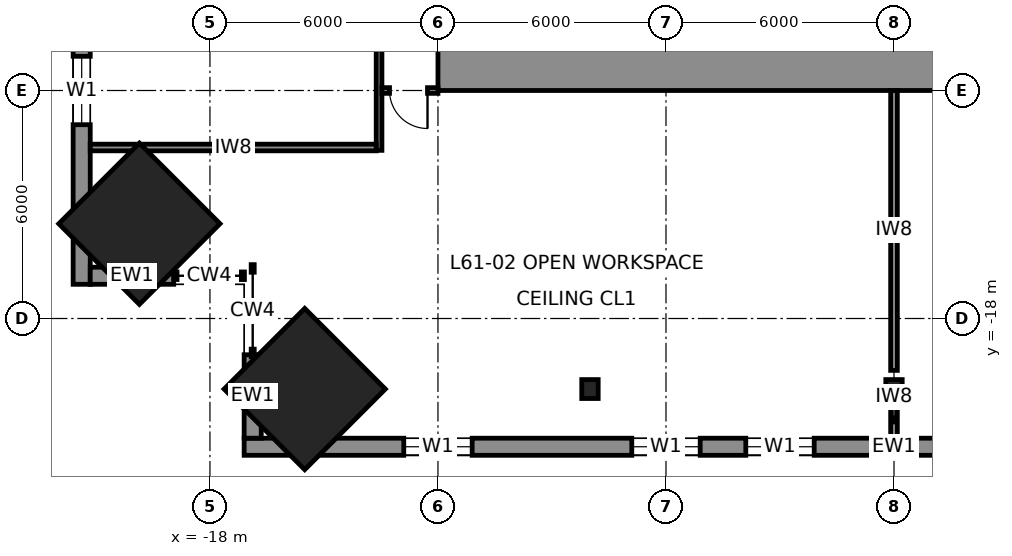
"""IFC4 building model, lengths in metres.
Left out: names, types, materials, properties, quantities, classifications, styles, units other than length and angle.
Written with IfcOpenShell. Run it as: python <this file> out.ifc"""

import sys

from ifc_helpers import new_model, si_unit, direction, frame, frame_2d, origin, origin_2d, place, context, subcontext, project, spatial, rectangle, i_section, extrude, element, fill, save


model = new_model("IFC4")
c1 = context("Model", 3, precision=1e-05, world=origin(), true_north=direction((0.0, 1.0)))
c2 = subcontext(c1, "Body", "Model", "MODEL_VIEW")
j1 = project(units=[si_unit("LENGTHUNIT", "METRE"), si_unit("PLANEANGLEUNIT", "RADIAN")], contexts=[c1])
p1 = place(None, origin())
s1 = spatial("IfcSite", under=j1, at=p1, CompositionType="ELEMENT")
p2 = place(p1, origin())
s2 = spatial("IfcBuilding", under=s1, at=p2, CompositionType="ELEMENT")
p3 = place(p2, frame((0.0, 0.0, 273.8)))
s3 = spatial("IfcBuildingStorey", under=s2, at=p3, CompositionType="ELEMENT", Elevation=273.8)
for number, where, z_axis, x_axis in (
    (1, (-15.506, -19.856, 0.0), (0.04, 0.04, 0.998), (-0.708, 0.707, 0.0)),
    (2, (-19.856, -15.506, 0.0), (0.04, 0.04, 0.998), (-0.707, 0.708, 0.0)),
):
    element("IfcColumn", number, at=place(p3, frame(where, z_axis=z_axis, x_axis=x_axis)), inside=s3, PredefinedType="COLUMN", context=c2, shape_type="SweptSolid", body=[
        extrude(rectangle(XDim=3.0, YDim=3.0, at=origin_2d()), origin(), (0.0, 0.0, 1.0), 4.007),
    ])
for number, where, z_axis, x_axis in (
    (3, (0.0, -19.856, 0.0), (0.0, 0.04, 0.999), (-1.0, 0.0, 0.0)),
    (4, (-8.0, -19.856, 0.0), (0.0, 0.04, 0.999), (-1.0, 0.0, 0.0)),
):
    element("IfcColumn", number, at=place(p3, frame(where, z_axis=z_axis, x_axis=x_axis)), inside=s3, PredefinedType="COLUMN", context=c2, shape_type="SweptSolid", body=[
        extrude(i_section(OverallWidth=0.432, OverallDepth=0.498, WebThickness=0.056, FlangeThickness=0.089, at=origin_2d()), origin(), (0.0, 0.0, 1.0), 4.003),
    ])
p4 = place(p3, frame((12.0, -11.25, 0.0), z_axis=(0.0, 0.0, 1.0), x_axis=(-1.0, 0.0, 0.0)))
e5 = element("IfcWall", 5, at=p4, inside=s3, PredefinedType="SHEAR", context=c2, shape_type="SweptSolid", body=[
    extrude(rectangle(XDim=24.0, YDim=1.5, at=frame_2d((12.0, 0.0))), origin(), (0.0, 0.0, 1.0), 4.0),
])
p5 = place(p3, frame((-17.1, -21.375, 0.0), z_axis=(0.0, 0.0, 1.0), x_axis=(1.0, 0.0, 0.0)))
e6 = element("IfcWall", 6, at=p5, inside=s3, PredefinedType="SOLIDWALL", context=c2, shape_type="SweptSolid", body=[
    extrude(rectangle(XDim=34.2, YDim=0.45, at=frame_2d((17.1, 0.0))), origin(), (0.0, 0.0, 1.0), 3.83),
])
p6 = place(p5, frame((4.2, 0.0, 0.7)))
e7 = element("IfcOpeningElement", 7, at=p6, cuts=e6, PredefinedType="OPENING", context=c2, shape_type="SweptSolid", body=[
    extrude(rectangle(XDim=1.8, YDim=2.6, at=frame_2d((0.9, 1.3))), frame((0.0, 0.235, 0.0), z_axis=(0.0, -1.0, 0.0), x_axis=(1.0, 0.0, 0.0)), (0.0, 0.0, 1.0), 0.47),
])
p7 = place(p5, frame((10.2, 0.0, 0.7)))
e8 = element("IfcOpeningElement", 8, at=p7, cuts=e6, PredefinedType="OPENING", context=c2, shape_type="SweptSolid", body=[
    extrude(rectangle(XDim=1.8, YDim=2.6, at=frame_2d((0.9, 1.3))), frame((0.0, 0.235, 0.0), z_axis=(0.0, -1.0, 0.0), x_axis=(1.0, 0.0, 0.0)), (0.0, 0.0, 1.0), 0.47),
])
p8 = place(p5, frame((13.2, 0.0, 0.7)))
e9 = element("IfcOpeningElement", 9, at=p8, cuts=e6, PredefinedType="OPENING", context=c2, shape_type="SweptSolid", body=[
    extrude(rectangle(XDim=1.8, YDim=2.6, at=frame_2d((0.9, 1.3))), frame((0.0, 0.235, 0.0), z_axis=(0.0, -1.0, 0.0), x_axis=(1.0, 0.0, 0.0)), (0.0, 0.0, 1.0), 0.47),
])
p9 = place(p5, frame((19.2, 0.0, 0.7)))
e10 = element("IfcOpeningElement", 10, at=p9, cuts=e6, PredefinedType="OPENING", context=c2, shape_type="SweptSolid", body=[
    extrude(rectangle(XDim=1.8, YDim=2.6, at=frame_2d((0.9, 1.3))), frame((0.0, 0.235, 0.0), z_axis=(0.0, -1.0, 0.0), x_axis=(1.0, 0.0, 0.0)), (0.0, 0.0, 1.0), 0.47),
])
p10 = place(p5, frame((22.2, 0.0, 0.7)))
e11 = element("IfcOpeningElement", 11, at=p10, cuts=e6, PredefinedType="OPENING", context=c2, shape_type="SweptSolid", body=[
    extrude(rectangle(XDim=1.8, YDim=2.6, at=frame_2d((0.9, 1.3))), frame((0.0, 0.235, 0.0), z_axis=(0.0, -1.0, 0.0), x_axis=(1.0, 0.0, 0.0)), (0.0, 0.0, 1.0), 0.47),
])
p11 = place(p5, frame((28.2, 0.0, 0.7)))
e12 = element("IfcOpeningElement", 12, at=p11, cuts=e6, PredefinedType="OPENING", context=c2, shape_type="SweptSolid", body=[
    extrude(rectangle(XDim=1.8, YDim=2.6, at=frame_2d((0.9, 1.3))), frame((0.0, 0.235, 0.0), z_axis=(0.0, -1.0, 0.0), x_axis=(1.0, 0.0, 0.0)), (0.0, 0.0, 1.0), 0.47),
])
p12 = place(p3, frame((-21.375, 17.1, 0.0), z_axis=(0.0, 0.0, 1.0), x_axis=(0.0, -1.0, 0.0)))
e13 = element("IfcWall", 13, at=p12, inside=s3, PredefinedType="SOLIDWALL", context=c2, shape_type="SweptSolid", body=[
    extrude(rectangle(XDim=34.2, YDim=0.45, at=frame_2d((17.1, 0.0))), origin(), (0.0, 0.0, 1.0), 3.83),
])
p13 = place(p12, frame((4.2, 0.0, 0.7)))
e14 = element("IfcOpeningElement", 14, at=p13, cuts=e13, PredefinedType="OPENING", context=c2, shape_type="SweptSolid", body=[
    extrude(rectangle(XDim=1.8, YDim=2.6, at=frame_2d((0.9, 1.3))), frame((0.0, 0.235, 0.0), z_axis=(0.0, -1.0, 0.0), x_axis=(1.0, 0.0, 0.0)), (0.0, 0.0, 1.0), 0.47),
])
p14 = place(p12, frame((10.2, 0.0, 0.7)))
e15 = element("IfcOpeningElement", 15, at=p14, cuts=e13, PredefinedType="OPENING", context=c2, shape_type="SweptSolid", body=[
    extrude(rectangle(XDim=1.8, YDim=2.6, at=frame_2d((0.9, 1.3))), frame((0.0, 0.235, 0.0), z_axis=(0.0, -1.0, 0.0), x_axis=(1.0, 0.0, 0.0)), (0.0, 0.0, 1.0), 0.47),
])
p15 = place(p12, frame((13.2, 0.0, 0.7)))
e16 = element("IfcOpeningElement", 16, at=p15, cuts=e13, PredefinedType="OPENING", context=c2, shape_type="SweptSolid", body=[
    extrude(rectangle(XDim=1.8, YDim=2.6, at=frame_2d((0.9, 1.3))), frame((0.0, 0.235, 0.0), z_axis=(0.0, -1.0, 0.0), x_axis=(1.0, 0.0, 0.0)), (0.0, 0.0, 1.0), 0.47),
])
p16 = place(p12, frame((19.2, 0.0, 0.7)))
e17 = element("IfcOpeningElement", 17, at=p16, cuts=e13, PredefinedType="OPENING", context=c2, shape_type="SweptSolid", body=[
    extrude(rectangle(XDim=1.8, YDim=2.6, at=frame_2d((0.9, 1.3))), frame((0.0, 0.235, 0.0), z_axis=(0.0, -1.0, 0.0), x_axis=(1.0, 0.0, 0.0)), (0.0, 0.0, 1.0), 0.47),
])
p17 = place(p12, frame((22.2, 0.0, 0.7)))
e18 = element("IfcOpeningElement", 18, at=p17, cuts=e13, PredefinedType="OPENING", context=c2, shape_type="SweptSolid", body=[
    extrude(rectangle(XDim=1.8, YDim=2.6, at=frame_2d((0.9, 1.3))), frame((0.0, 0.235, 0.0), z_axis=(0.0, -1.0, 0.0), x_axis=(1.0, 0.0, 0.0)), (0.0, 0.0, 1.0), 0.47),
])
p18 = place(p12, frame((28.2, 0.0, 0.7)))
e19 = element("IfcOpeningElement", 19, at=p18, cuts=e13, PredefinedType="OPENING", context=c2, shape_type="SweptSolid", body=[
    extrude(rectangle(XDim=1.8, YDim=2.6, at=frame_2d((0.9, 1.3))), frame((0.0, 0.235, 0.0), z_axis=(0.0, -1.0, 0.0), x_axis=(1.0, 0.0, 0.0)), (0.0, 0.0, 1.0), 0.47),
])
for number, where, z_axis, x_axis in (
    (20, (-16.875, -18.954, 0.0), (0.0, 0.0, 1.0), (0.0, -1.0, 0.0)),
    (21, (-18.954, -16.875, 0.0), (0.0, 0.0, 1.0), (-1.0, 0.0, 0.0)),
):
    element("IfcWall", number, at=place(p3, frame(where, z_axis=z_axis, x_axis=x_axis)), inside=s3, PredefinedType="SOLIDWALL", context=c2, shape_type="SweptSolid", body=[
        extrude(rectangle(XDim=2.196, YDim=0.45, at=frame_2d((1.098, 0.0))), origin(), (0.0, 0.0, 1.0), 3.83),
    ])
p19 = place(p3, frame((-13.55, 13.575, 0.0), z_axis=(0.0, 0.0, 1.0), x_axis=(0.0, -1.0, 0.0)))
e22 = element("IfcWall", 22, at=p19, inside=s3, PredefinedType="PARTITIONING", context=c2, shape_type="SweptSolid", body=[
    extrude(rectangle(XDim=27.15, YDim=0.15, at=frame_2d((13.575, 0.0))), origin(), (0.0, 0.0, 1.0), 3.83),
])
p20 = place(p19, frame((21.225, 0.0, 0.0)))
e23 = element("IfcOpeningElement", 23, at=p20, cuts=e22, PredefinedType="OPENING", context=c2, shape_type="SweptSolid", body=[
    extrude(rectangle(XDim=1.4, YDim=2.3, at=frame_2d((0.7, 1.15))), frame((0.0, 0.085, 0.0), z_axis=(0.0, -1.0, 0.0), x_axis=(1.0, 0.0, 0.0)), (0.0, 0.0, 1.0), 0.17),
])
p21 = place(p19, frame((9.075, 0.0, 0.0)))
e24 = element("IfcOpeningElement", 24, at=p21, cuts=e22, PredefinedType="OPENING", context=c2, shape_type="SweptSolid", body=[
    extrude(rectangle(XDim=1.0, YDim=2.3, at=frame_2d((0.5, 1.15))), frame((0.0, 0.085, 0.0), z_axis=(0.0, -1.0, 0.0), x_axis=(1.0, 0.0, 0.0)), (0.0, 0.0, 1.0), 0.17),
])
p22 = place(p19, frame((16.575, 0.0, 0.0)))
e25 = element("IfcOpeningElement", 25, at=p22, cuts=e22, PredefinedType="OPENING", context=c2, shape_type="SweptSolid", body=[
    extrude(rectangle(XDim=1.0, YDim=2.3, at=frame_2d((0.5, 1.15))), frame((0.0, 0.085, 0.0), z_axis=(0.0, -1.0, 0.0), x_axis=(1.0, 0.0, 0.0)), (0.0, 0.0, 1.0), 0.17),
])
p23 = place(p3, frame((-12.0, -12.0, 0.0), z_axis=(0.0, 0.0, 1.0), x_axis=(-1.0, 0.0, 0.0)))
e26 = element("IfcWall", 26, at=p23, inside=s3, PredefinedType="PARTITIONING", context=c2, shape_type="SweptSolid", body=[
    extrude(rectangle(XDim=1.475, YDim=0.15, at=frame_2d((0.738, 0.0))), origin(), (0.0, 0.0, 1.0), 3.83),
])
p24 = place(p23, frame((0.275, 0.0, 0.0)))
e27 = element("IfcOpeningElement", 27, at=p24, cuts=e26, PredefinedType="OPENING", context=c2, shape_type="SweptSolid", body=[
    extrude(rectangle(XDim=1.0, YDim=2.3, at=frame_2d((0.5, 1.15))), frame((0.0, 0.085, 0.0), z_axis=(0.0, -1.0, 0.0), x_axis=(1.0, 0.0, 0.0)), (0.0, 0.0, 1.0), 0.17),
])
p25 = place(p3, frame((-13.625, -13.5, 0.0), z_axis=(0.0, 0.0, 1.0), x_axis=(-1.0, 0.0, 0.0)))
e28 = element("IfcWall", 28, at=p25, inside=s3, PredefinedType="PARTITIONING", context=c2, shape_type="SweptSolid", body=[
    extrude(rectangle(XDim=7.525, YDim=0.175, at=frame_2d((3.762, 0.0))), origin(), (0.0, 0.0, 1.0), 3.83),
])
p26 = place(p3, frame((0.0, -12.0, 0.0), z_axis=(0.0, 0.0, 1.0), x_axis=(0.0, -1.0, 0.0)))
e29 = element("IfcWall", 29, at=p26, inside=s3, PredefinedType="PARTITIONING", context=c2, shape_type="SweptSolid", body=[
    extrude(rectangle(XDim=7.365, YDim=0.175, at=frame_2d((3.683, 0.0))), origin(), (0.0, 0.0, 1.0), 3.24),
])
p27 = place(p3, frame((0.0, -20.186, 0.0), z_axis=(0.0, 0.0, 1.0), x_axis=(0.0, -1.0, 0.0)))
e30 = element("IfcWall", 30, at=p27, inside=s3, PredefinedType="PARTITIONING", context=c2, shape_type="SweptSolid", body=[
    extrude(rectangle(XDim=0.964, YDim=0.175, at=frame_2d((0.482, 0.0))), origin(), (0.0, 0.0, 1.0), 3.83),
])
p28 = place(p6, origin())
e31 = element("IfcWindow", 31, at=p28, inside=s3, PartitioningType="SINGLE_PANEL", PredefinedType="WINDOW", context=c2, shape_type="SweptSolid", body=[
    extrude(rectangle(XDim=1.8, YDim=2.6, at=frame_2d((0.9, 1.3))), frame((0.0, 0.03, 0.0), z_axis=(0.0, -1.0, 0.0), x_axis=(1.0, 0.0, 0.0)), (0.0, 0.0, 1.0), 0.06),
])
fill(e7, e31)
p29 = place(p7, origin())
e32 = element("IfcWindow", 32, at=p29, inside=s3, PartitioningType="SINGLE_PANEL", PredefinedType="WINDOW", context=c2, shape_type="SweptSolid", body=[
    extrude(rectangle(XDim=1.8, YDim=2.6, at=frame_2d((0.9, 1.3))), frame((0.0, 0.03, 0.0), z_axis=(0.0, -1.0, 0.0), x_axis=(1.0, 0.0, 0.0)), (0.0, 0.0, 1.0), 0.06),
])
fill(e8, e32)
p30 = place(p8, origin())
e33 = element("IfcWindow", 33, at=p30, inside=s3, PartitioningType="SINGLE_PANEL", PredefinedType="WINDOW", context=c2, shape_type="SweptSolid", body=[
    extrude(rectangle(XDim=1.8, YDim=2.6, at=frame_2d((0.9, 1.3))), frame((0.0, 0.03, 0.0), z_axis=(0.0, -1.0, 0.0), x_axis=(1.0, 0.0, 0.0)), (0.0, 0.0, 1.0), 0.06),
])
fill(e9, e33)
p31 = place(p18, origin())
e34 = element("IfcWindow", 34, at=p31, inside=s3, PartitioningType="SINGLE_PANEL", PredefinedType="WINDOW", context=c2, shape_type="SweptSolid", body=[
    extrude(rectangle(XDim=1.8, YDim=2.6, at=frame_2d((0.9, 1.3))), frame((0.0, 0.03, 0.0), z_axis=(0.0, -1.0, 0.0), x_axis=(1.0, 0.0, 0.0)), (0.0, 0.0, 1.0), 0.06),
])
fill(e19, e34)
p32 = place(p24, origin())
e35 = element("IfcDoor", 35, at=p32, inside=s3, OperationType="SINGLE_SWING_LEFT", PredefinedType="DOOR", context=c2, shape_type="SweptSolid", body=[
    extrude(rectangle(XDim=1.0, YDim=2.3, at=frame_2d((0.5, 1.15))), frame((0.0, 0.025, 0.0), z_axis=(0.0, -1.0, 0.0), x_axis=(1.0, 0.0, 0.0)), (0.0, 0.0, 1.0), 0.05),
])
fill(e27, e35)
save(model, sys.argv[1])
